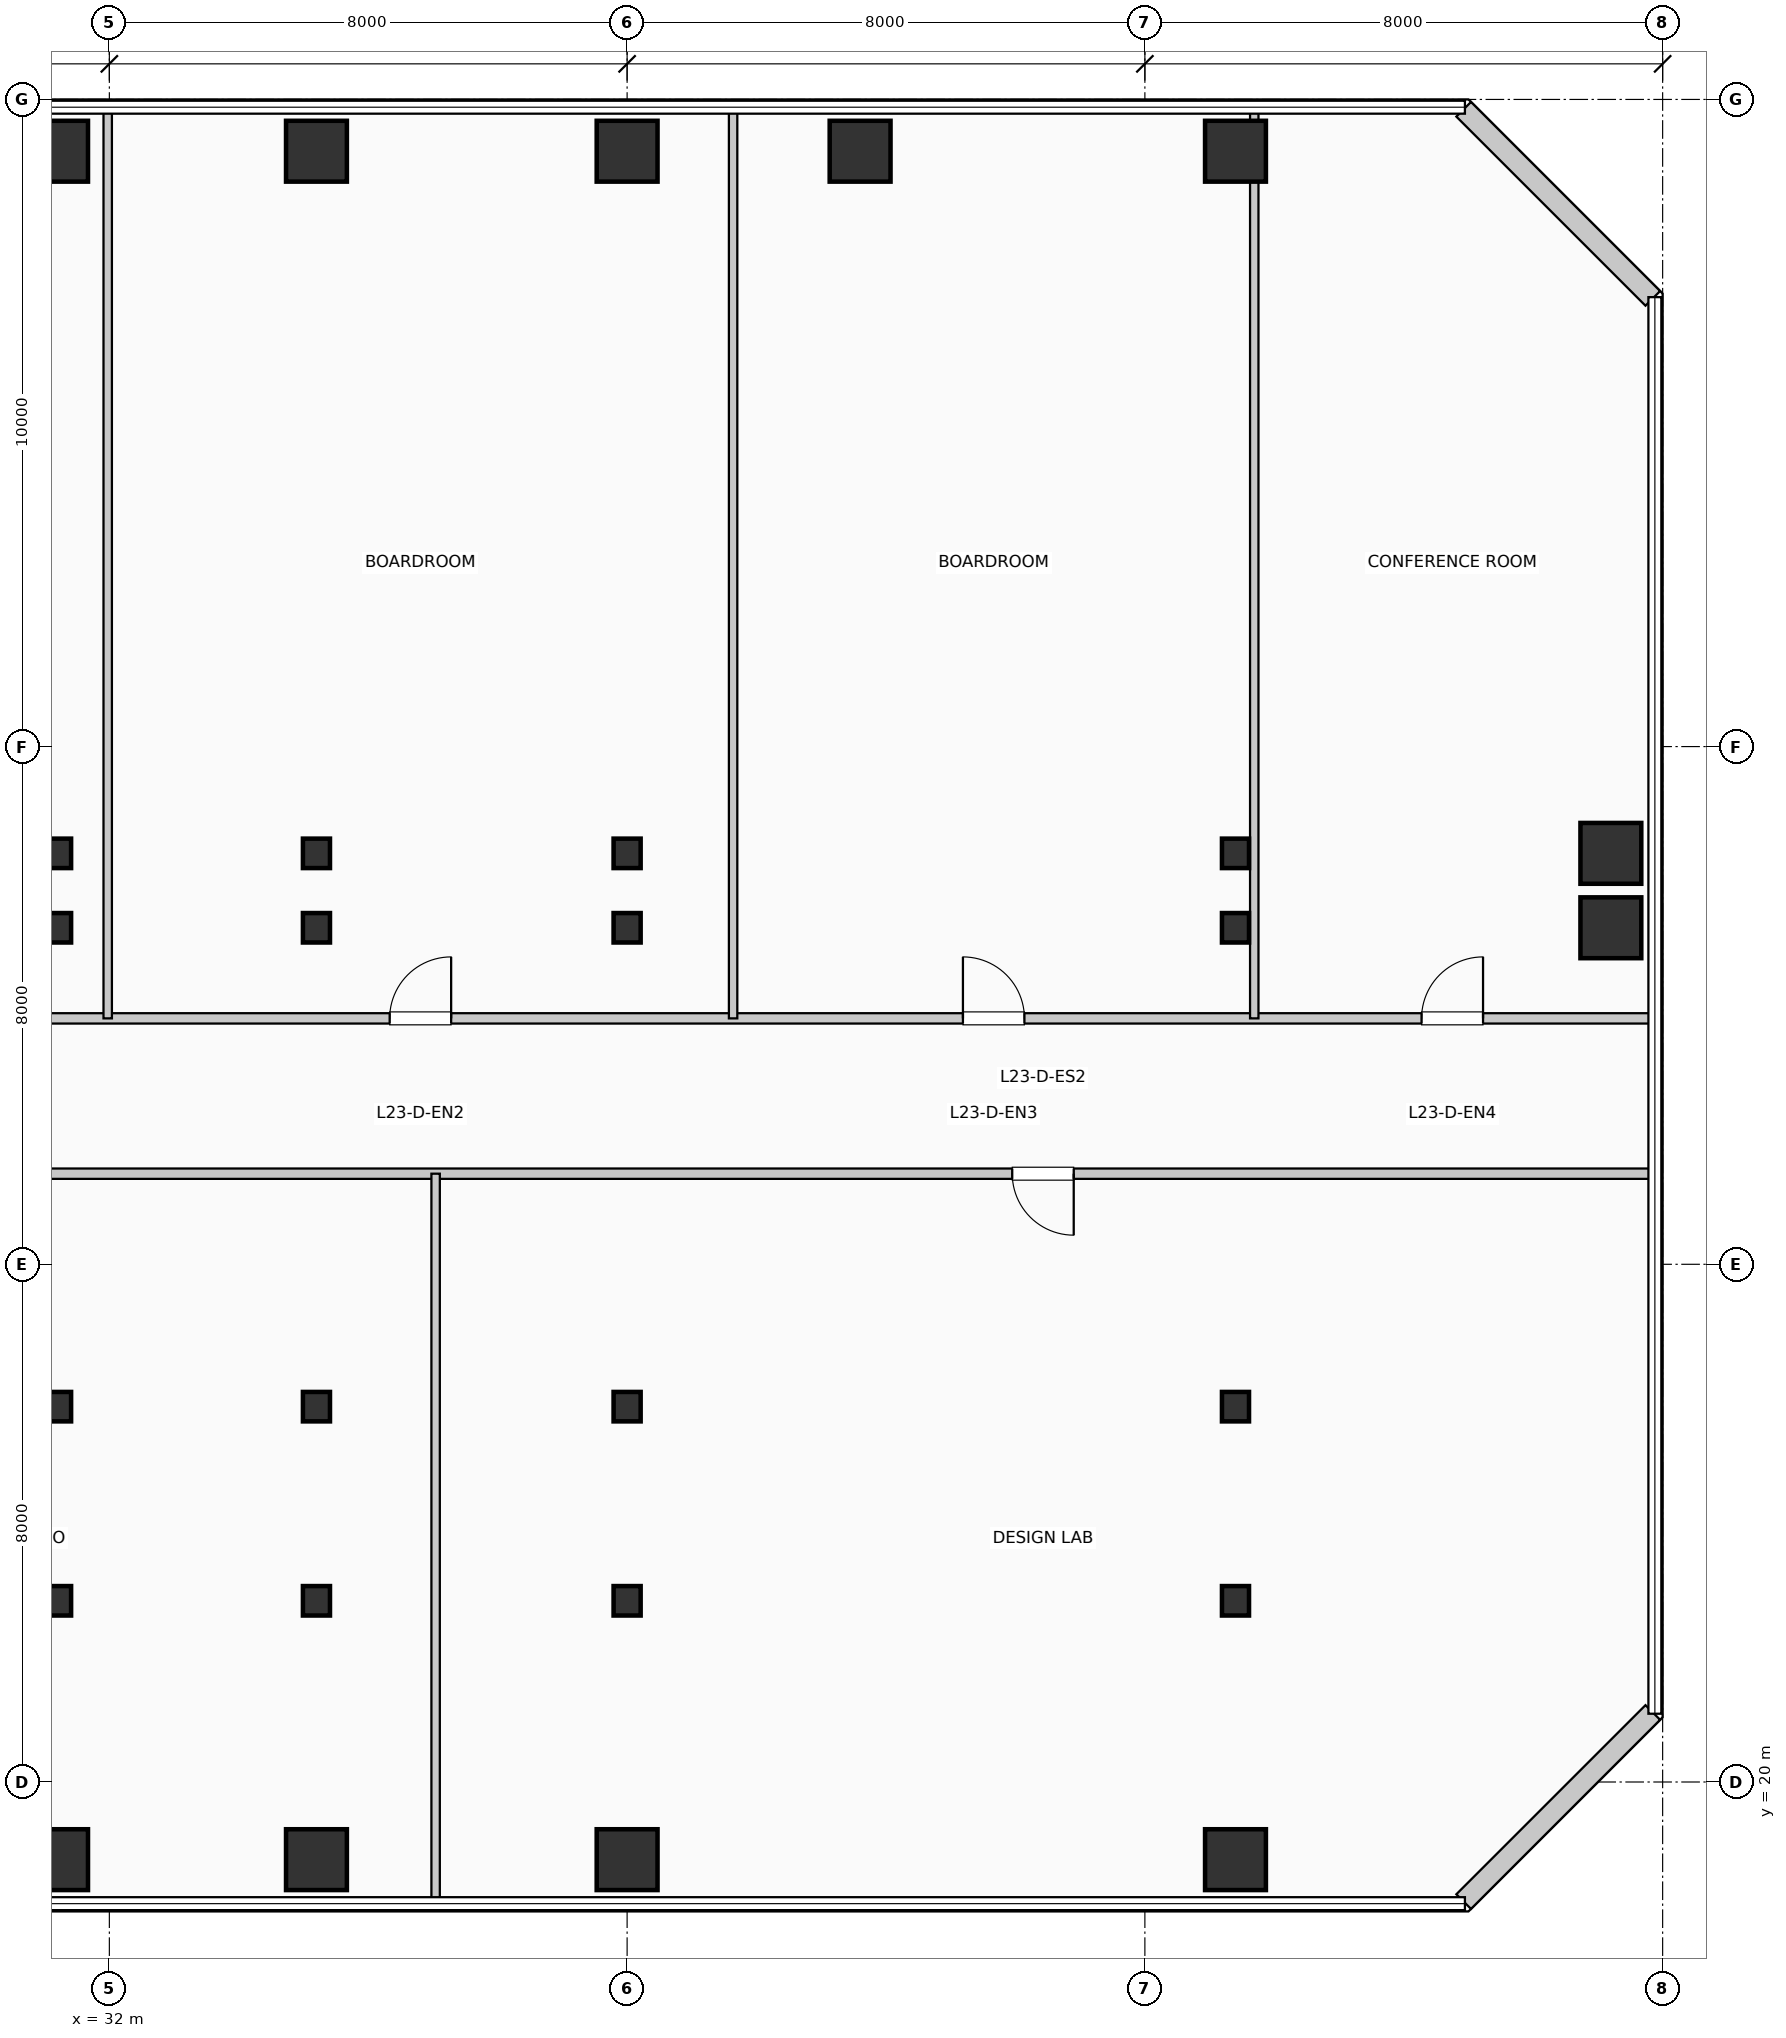
"""IFC4 building model, lengths in metres.
Left out: names, types, materials, properties, quantities, classifications, styles, units other than length and angle.
Written with IfcOpenShell. Run it as: python <this file> out.ifc"""

import sys

from ifc_helpers import new_model, si_unit, direction, frame, frame_2d, origin, origin_2d, place, context, subcontext, project, spatial, rectangle, i_section, extrude, element, fill, save


model = new_model("IFC4")
c1 = context("Model", 3, precision=1e-05, world=origin(), true_north=direction((0.0, 1.0)))
c2 = subcontext(c1, "Body", "Model", "MODEL_VIEW")
j1 = project(units=[si_unit("LENGTHUNIT", "METRE"), si_unit("PLANEANGLEUNIT", "RADIAN")], contexts=[c1])
p1 = place(None, origin())
s1 = spatial("IfcSite", under=j1, at=p1, CompositionType="ELEMENT")
p2 = place(p1, origin())
s2 = spatial("IfcBuilding", under=s1, at=p2, CompositionType="ELEMENT")
p3 = place(p2, frame((0.0, 0.0, 98.67)))
s3 = spatial("IfcBuildingStorey", under=s2, at=p3, CompositionType="ELEMENT", Elevation=98.67)
p4 = place(p3, frame((31.2, 18.8, 0.0), z_axis=(0.0, 0.0, 1.0), x_axis=(1.0, 0.0, 0.0)))
e1 = element("IfcColumn", 1, at=p4, inside=s3, PredefinedType="COLUMN", context=c2, shape_type="SweptSolid", body=[
    extrude(rectangle(XDim=0.94, YDim=0.94, at=origin_2d()), origin(), (0.0, 0.0, 1.0), 3.96),
])
for number, where, z_axis, x_axis in (
    (2, (31.2, 22.8, 0.0), (0.0, 0.0, 1.0), (1.0, 0.0, 0.0)),
    (3, (31.2, 25.8, 0.0), (0.0, 0.0, 1.0), (1.0, 0.0, 0.0)),
    (4, (31.2, 33.2, 0.0), (0.0, 0.0, 1.0), (1.0, 0.0, 0.0)),
    (5, (31.2, 34.35, 0.0), (0.0, 0.0, 1.0), (1.0, 0.0, 0.0)),
):
    element("IfcColumn", number, at=place(p3, frame(where, z_axis=z_axis, x_axis=x_axis)), inside=s3, PredefinedType="COLUMN", context=c2, shape_type="SweptSolid", body=[
        extrude(i_section(OverallWidth=0.418, OverallDepth=0.455, WebThickness=0.032, FlangeThickness=0.051, at=origin_2d()), origin(), (0.0, 0.0, 1.0), 3.96),
    ])
for number, where, z_axis, x_axis in (
    (6, (31.2, 45.2, 0.0), (0.0, 0.0, 1.0), (1.0, 0.0, 0.0)),
    (7, (35.2, 18.8, 0.0), (0.0, 0.0, 1.0), (1.0, 0.0, 0.0)),
):
    element("IfcColumn", number, at=place(p3, frame(where, z_axis=z_axis, x_axis=x_axis)), inside=s3, PredefinedType="COLUMN", context=c2, shape_type="SweptSolid", body=[
        extrude(rectangle(XDim=0.94, YDim=0.94, at=origin_2d()), origin(), (0.0, 0.0, 1.0), 3.96),
    ])
for number, where, z_axis, x_axis in (
    (8, (35.2, 22.8, 0.0), (0.0, 0.0, 1.0), (1.0, 0.0, 0.0)),
    (9, (35.2, 25.8, 0.0), (0.0, 0.0, 1.0), (1.0, 0.0, 0.0)),
    (10, (35.2, 33.2, 0.0), (0.0, 0.0, 1.0), (1.0, 0.0, 0.0)),
    (11, (35.2, 34.35, 0.0), (0.0, 0.0, 1.0), (1.0, 0.0, 0.0)),
):
    element("IfcColumn", number, at=place(p3, frame(where, z_axis=z_axis, x_axis=x_axis)), inside=s3, PredefinedType="COLUMN", context=c2, shape_type="SweptSolid", body=[
        extrude(i_section(OverallWidth=0.418, OverallDepth=0.455, WebThickness=0.032, FlangeThickness=0.051, at=origin_2d()), origin(), (0.0, 0.0, 1.0), 3.96),
    ])
for number, where, z_axis, x_axis in (
    (12, (35.2, 45.2, 0.0), (0.0, 0.0, 1.0), (1.0, 0.0, 0.0)),
    (13, (40.0, 18.8, 0.0), (0.0, 0.0, 1.0), (1.0, 0.0, 0.0)),
):
    element("IfcColumn", number, at=place(p3, frame(where, z_axis=z_axis, x_axis=x_axis)), inside=s3, PredefinedType="COLUMN", context=c2, shape_type="SweptSolid", body=[
        extrude(rectangle(XDim=0.94, YDim=0.94, at=origin_2d()), origin(), (0.0, 0.0, 1.0), 3.96),
    ])
for number, where, z_axis, x_axis in (
    (14, (40.0, 22.8, 0.0), (0.0, 0.0, 1.0), (1.0, 0.0, 0.0)),
    (15, (40.0, 25.8, 0.0), (0.0, 0.0, 1.0), (1.0, 0.0, 0.0)),
    (16, (40.0, 33.2, 0.0), (0.0, 0.0, 1.0), (1.0, 0.0, 0.0)),
    (17, (40.0, 34.35, 0.0), (0.0, 0.0, 1.0), (1.0, 0.0, 0.0)),
):
    element("IfcColumn", number, at=place(p3, frame(where, z_axis=z_axis, x_axis=x_axis)), inside=s3, PredefinedType="COLUMN", context=c2, shape_type="SweptSolid", body=[
        extrude(i_section(OverallWidth=0.418, OverallDepth=0.455, WebThickness=0.032, FlangeThickness=0.051, at=origin_2d()), origin(), (0.0, 0.0, 1.0), 3.96),
    ])
for number, where, z_axis, x_axis in (
    (18, (40.0, 45.2, 0.0), (0.0, 0.0, 1.0), (1.0, 0.0, 0.0)),
    (19, (43.6, 45.2, 0.0), (0.0, 0.0, 1.0), (1.0, 0.0, 0.0)),
    (20, (49.4, 18.8, 0.0), (0.0, 0.0, 1.0), (1.0, 0.0, 0.0)),
):
    element("IfcColumn", number, at=place(p3, frame(where, z_axis=z_axis, x_axis=x_axis)), inside=s3, PredefinedType="COLUMN", context=c2, shape_type="SweptSolid", body=[
        extrude(rectangle(XDim=0.94, YDim=0.94, at=origin_2d()), origin(), (0.0, 0.0, 1.0), 3.96),
    ])
for number, where, z_axis, x_axis in (
    (21, (49.4, 22.8, 0.0), (0.0, 0.0, 1.0), (1.0, 0.0, 0.0)),
    (22, (49.4, 25.8, 0.0), (0.0, 0.0, 1.0), (1.0, 0.0, 0.0)),
    (23, (49.4, 33.2, 0.0), (0.0, 0.0, 1.0), (1.0, 0.0, 0.0)),
    (24, (49.4, 34.35, 0.0), (0.0, 0.0, 1.0), (1.0, 0.0, 0.0)),
):
    element("IfcColumn", number, at=place(p3, frame(where, z_axis=z_axis, x_axis=x_axis)), inside=s3, PredefinedType="COLUMN", context=c2, shape_type="SweptSolid", body=[
        extrude(i_section(OverallWidth=0.418, OverallDepth=0.455, WebThickness=0.032, FlangeThickness=0.051, at=origin_2d()), origin(), (0.0, 0.0, 1.0), 3.96),
    ])
for number, where, z_axis, x_axis in (
    (25, (49.4, 45.2, 0.0), (0.0, 0.0, 1.0), (1.0, 0.0, 0.0)),
    (26, (55.2, 33.2, 0.0), (0.0, 0.0, 1.0), (1.0, 0.0, 0.0)),
    (27, (55.2, 34.35, 0.0), (0.0, 0.0, 1.0), (1.0, 0.0, 0.0)),
):
    element("IfcColumn", number, at=place(p3, frame(where, z_axis=z_axis, x_axis=x_axis)), inside=s3, PredefinedType="COLUMN", context=c2, shape_type="SweptSolid", body=[
        extrude(rectangle(XDim=0.94, YDim=0.94, at=origin_2d()), origin(), (0.0, 0.0, 1.0), 3.96),
    ])
for number, where, z_axis, x_axis in (
    (28, (52.926, 18.152, 0.0), (0.0, 0.0, 1.0), (0.707, 0.707, 0.0)),
    (29, (55.848, 42.926, 0.0), (0.0, 0.0, 1.0), (-0.707, 0.707, 0.0)),
):
    element("IfcWall", number, at=place(p3, frame(where, z_axis=z_axis, x_axis=x_axis)), inside=s3, PredefinedType="SOLIDWALL", context=c2, shape_type="SweptSolid", body=[
        extrude(rectangle(XDim=4.133, YDim=0.32, at=frame_2d((2.066, 0.0))), origin(), (0.0, 0.0, 1.0), 3.71),
    ])
p5 = place(p3, frame((23.45, 29.4, 0.0), z_axis=(0.0, 0.0, 1.0), x_axis=(1.0, 0.0, 0.0)))
e30 = element("IfcWall", 30, at=p5, inside=s3, PredefinedType="PARTITIONING", context=c2, shape_type="SweptSolid", body=[
    extrude(rectangle(XDim=32.36, YDim=0.16, at=frame_2d((16.18, 0.0))), origin(), (0.0, 0.0, 1.0), 3.365),
])
p6 = place(p5, frame((7.271, 0.0, 0.0), z_axis=(0.0, 0.0, 1.0), x_axis=(-1.0, 0.0, 0.0)))
e31 = element("IfcOpeningElement", 31, at=p6, cuts=e30, PredefinedType="OPENING", context=c2, shape_type="SweptSolid", body=[
    extrude(rectangle(XDim=0.95, YDim=2.15, at=frame_2d((0.475, 1.075))), frame((0.0, 0.09, 0.0), z_axis=(0.0, -1.0, 0.0), x_axis=(1.0, 0.0, 0.0)), (0.0, 0.0, 1.0), 0.18),
])
p7 = place(p5, frame((23.45, 0.0, 0.0), z_axis=(0.0, 0.0, 1.0), x_axis=(-1.0, 0.0, 0.0)))
e32 = element("IfcOpeningElement", 32, at=p7, cuts=e30, PredefinedType="OPENING", context=c2, shape_type="SweptSolid", body=[
    extrude(rectangle(XDim=0.95, YDim=2.15, at=frame_2d((0.475, 1.075))), frame((0.0, 0.09, 0.0), z_axis=(0.0, -1.0, 0.0), x_axis=(1.0, 0.0, 0.0)), (0.0, 0.0, 1.0), 0.18),
])
p8 = place(p3, frame((23.6, 31.8, 0.0), z_axis=(0.0, 0.0, 1.0), x_axis=(1.0, 0.0, 0.0)))
e33 = element("IfcWall", 33, at=p8, inside=s3, PredefinedType="PARTITIONING", context=c2, shape_type="SweptSolid", body=[
    extrude(rectangle(XDim=32.21, YDim=0.16, at=frame_2d((16.105, 0.0))), origin(), (0.0, 0.0, 1.0), 3.71),
])
p9 = place(p8, frame((3.712, 0.0, 0.0)))
e34 = element("IfcOpeningElement", 34, at=p9, cuts=e33, PredefinedType="OPENING", context=c2, shape_type="SweptSolid", body=[
    extrude(rectangle(XDim=0.95, YDim=2.15, at=frame_2d((0.475, 1.075))), frame((0.0, 0.09, 0.0), z_axis=(0.0, -1.0, 0.0), x_axis=(1.0, 0.0, 0.0)), (0.0, 0.0, 1.0), 0.18),
])
p10 = place(p8, frame((12.731, 0.0, 0.0)))
e35 = element("IfcOpeningElement", 35, at=p10, cuts=e33, PredefinedType="OPENING", context=c2, shape_type="SweptSolid", body=[
    extrude(rectangle(XDim=0.95, YDim=2.15, at=frame_2d((0.475, 1.075))), frame((0.0, 0.09, 0.0), z_axis=(0.0, -1.0, 0.0), x_axis=(1.0, 0.0, 0.0)), (0.0, 0.0, 1.0), 0.18),
])
p11 = place(p8, frame((21.589, 0.0, 0.0)))
e36 = element("IfcOpeningElement", 36, at=p11, cuts=e33, PredefinedType="OPENING", context=c2, shape_type="SweptSolid", body=[
    extrude(rectangle(XDim=0.95, YDim=2.15, at=frame_2d((0.475, 1.075))), frame((0.0, 0.09, 0.0), z_axis=(0.0, -1.0, 0.0), x_axis=(1.0, 0.0, 0.0)), (0.0, 0.0, 1.0), 0.18),
])
p12 = place(p8, frame((28.675, 0.0, 0.0)))
e37 = element("IfcOpeningElement", 37, at=p12, cuts=e33, PredefinedType="OPENING", context=c2, shape_type="SweptSolid", body=[
    extrude(rectangle(XDim=0.95, YDim=2.15, at=frame_2d((0.475, 1.075))), frame((0.0, 0.09, 0.0), z_axis=(0.0, -1.0, 0.0), x_axis=(1.0, 0.0, 0.0)), (0.0, 0.0, 1.0), 0.18),
])
p13 = place(p3, frame((37.041, 18.19, 0.0), z_axis=(0.0, 0.0, 1.0), x_axis=(0.0, 1.0, 0.0)))
e38 = element("IfcWall", 38, at=p13, inside=s3, PredefinedType="PARTITIONING", context=c2, shape_type="SweptSolid", body=[
    extrude(rectangle(XDim=11.21, YDim=0.13, at=frame_2d((5.605, 0.0))), origin(), (0.0, 0.0, 1.0), 3.71),
])
for number, where, z_axis, x_axis in (
    (39, (31.975, 31.8, 0.0), (0.0, 0.0, 1.0), (0.0, 1.0, 0.0)),
    (40, (41.638, 31.8, 0.0), (0.0, 0.0, 1.0), (0.0, 1.0, 0.0)),
):
    element("IfcWall", number, at=place(p3, frame(where, z_axis=z_axis, x_axis=x_axis)), inside=s3, PredefinedType="PARTITIONING", context=c2, shape_type="SweptSolid", body=[
        extrude(rectangle(XDim=14.01, YDim=0.13, at=frame_2d((7.005, 0.0))), origin(), (0.0, 0.0, 1.0), 3.71),
    ])
p14 = place(p3, frame((49.69, 31.8, 0.0), z_axis=(0.0, 0.0, 1.0), x_axis=(0.0, 1.0, 0.0)))
e41 = element("IfcWall", 41, at=p14, inside=s3, PredefinedType="PARTITIONING", context=c2, shape_type="SweptSolid", body=[
    extrude(rectangle(XDim=14.01, YDim=0.13, at=frame_2d((7.005, 0.0))), origin(), (0.0, 0.0, 1.0), 2.995),
])
p15 = place(p7, origin())
e42 = element("IfcDoor", 42, at=p15, inside=s3, OperationType="SINGLE_SWING_RIGHT", PredefinedType="DOOR", context=c2, shape_type="SweptSolid", body=[
    extrude(rectangle(XDim=0.95, YDim=2.15, at=frame_2d((0.475, 1.075))), frame((0.0, 0.025, 0.0), z_axis=(0.0, -1.0, 0.0), x_axis=(1.0, 0.0, 0.0)), (0.0, 0.0, 1.0), 0.05),
])
fill(e32, e42)
p16 = place(p10, origin())
e43 = element("IfcDoor", 43, at=p16, inside=s3, OperationType="SINGLE_SWING_RIGHT", PredefinedType="DOOR", context=c2, shape_type="SweptSolid", body=[
    extrude(rectangle(XDim=0.95, YDim=2.15, at=frame_2d((0.475, 1.075))), frame((0.0, 0.025, 0.0), z_axis=(0.0, -1.0, 0.0), x_axis=(1.0, 0.0, 0.0)), (0.0, 0.0, 1.0), 0.05),
])
fill(e35, e43)
p17 = place(p11, origin())
e44 = element("IfcDoor", 44, at=p17, inside=s3, OperationType="SINGLE_SWING_LEFT", PredefinedType="DOOR", context=c2, shape_type="SweptSolid", body=[
    extrude(rectangle(XDim=0.95, YDim=2.15, at=frame_2d((0.475, 1.075))), frame((0.0, 0.025, 0.0), z_axis=(0.0, -1.0, 0.0), x_axis=(1.0, 0.0, 0.0)), (0.0, 0.0, 1.0), 0.05),
])
fill(e36, e44)
p18 = place(p12, origin())
e45 = element("IfcDoor", 45, at=p18, inside=s3, OperationType="SINGLE_SWING_RIGHT", PredefinedType="DOOR", context=c2, shape_type="SweptSolid", body=[
    extrude(rectangle(XDim=0.95, YDim=2.15, at=frame_2d((0.475, 1.075))), frame((0.0, 0.025, 0.0), z_axis=(0.0, -1.0, 0.0), x_axis=(1.0, 0.0, 0.0)), (0.0, 0.0, 1.0), 0.05),
])
fill(e37, e45)
save(model, sys.argv[1])
